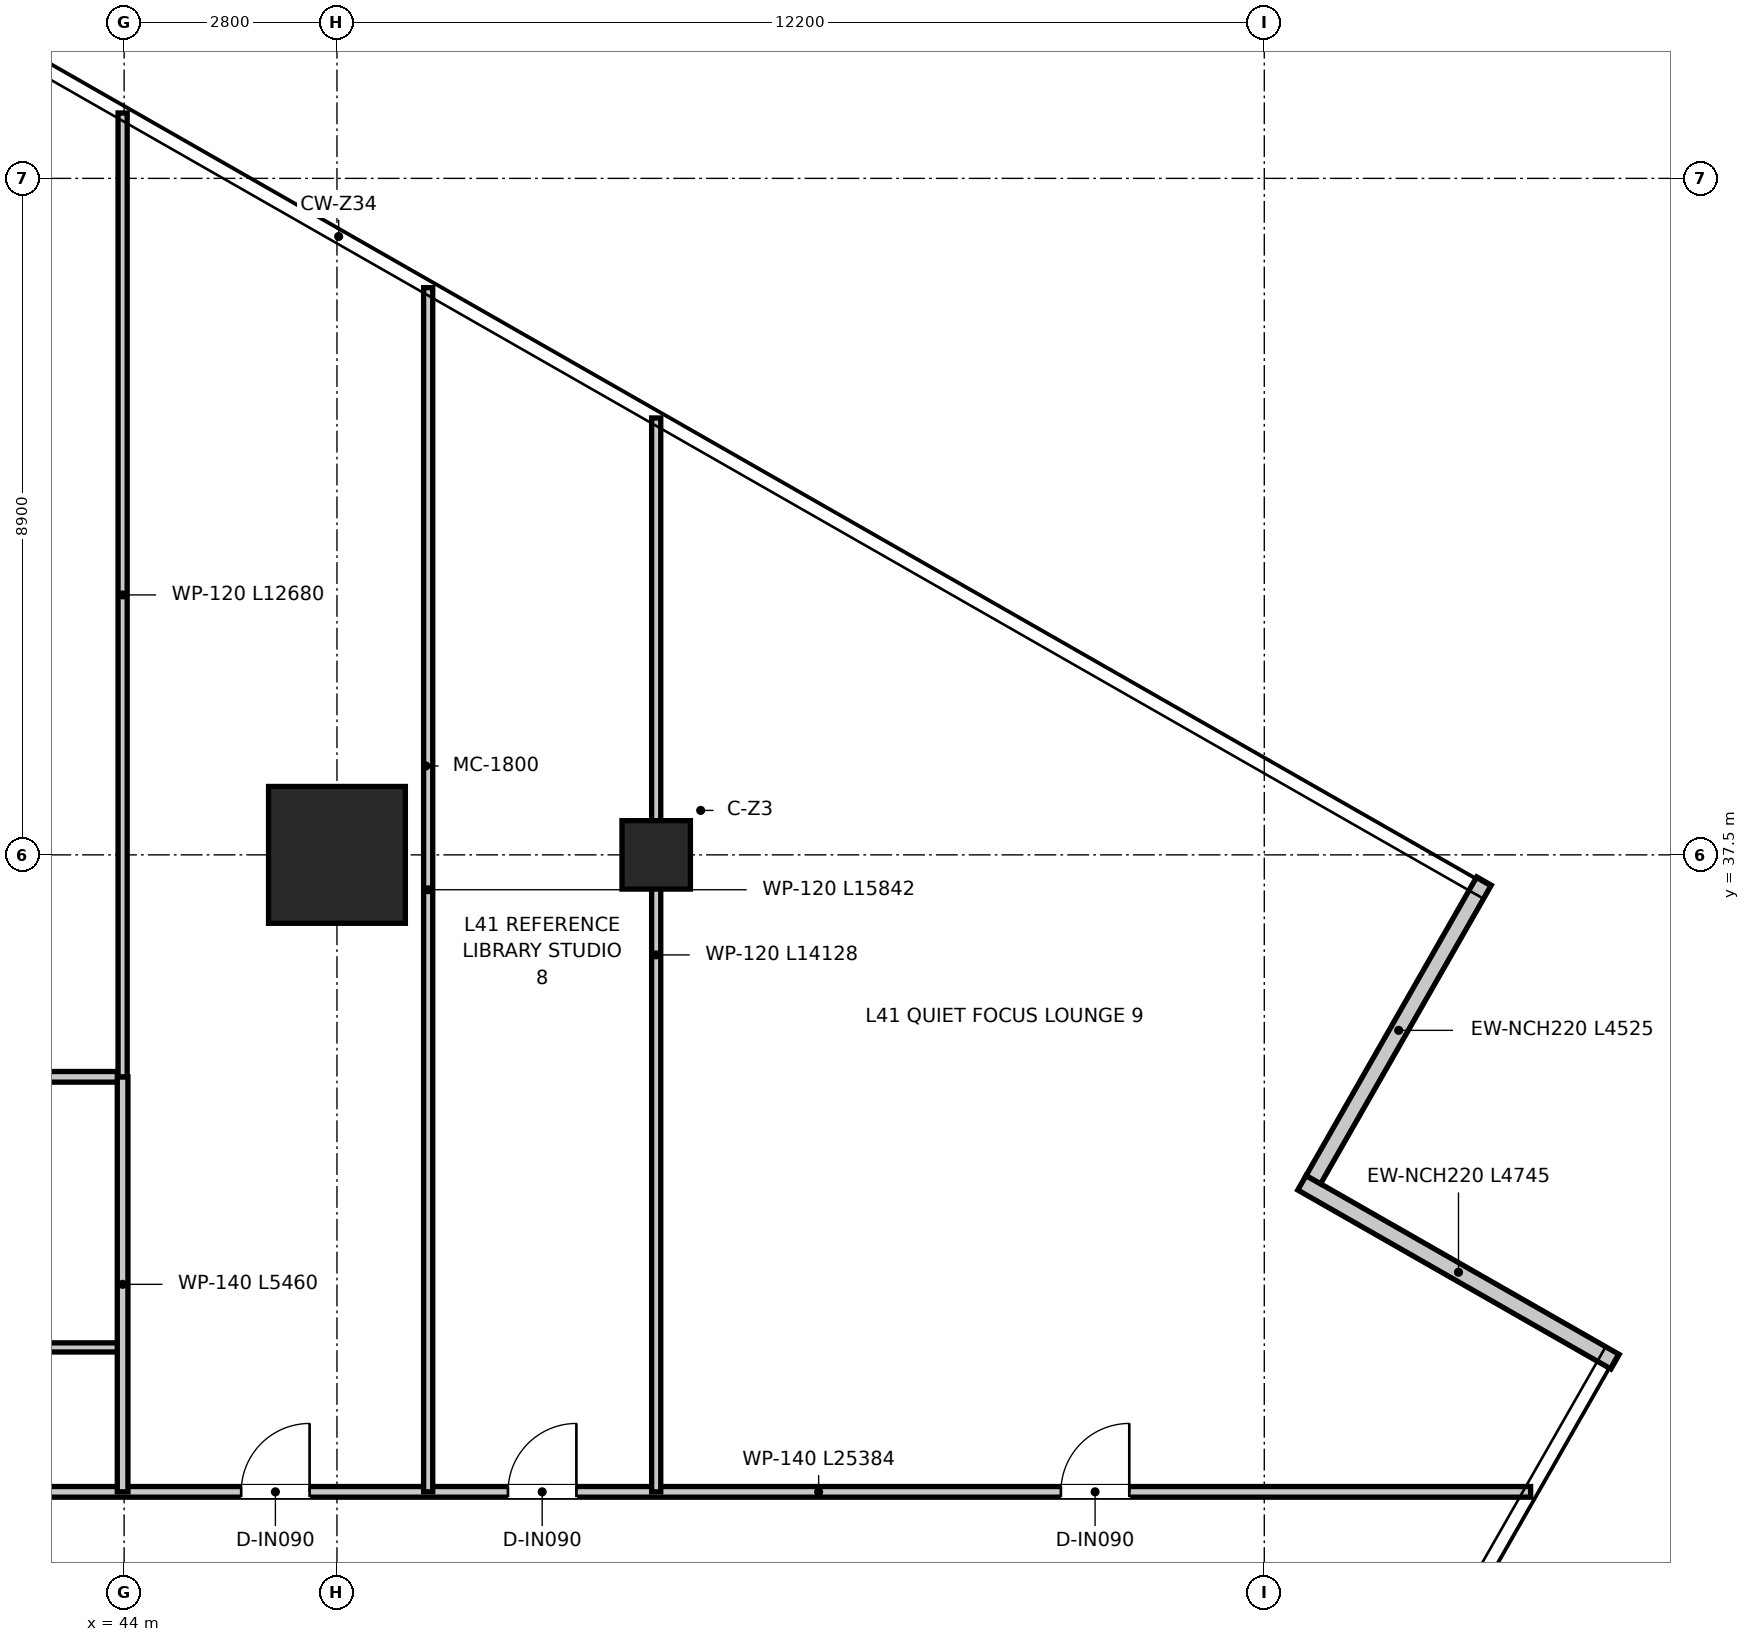
"""IFC4 building model, lengths in metres.
Left out: names, types, materials, properties, quantities, classifications, styles, units other than length and angle.
Written with IfcOpenShell. Run it as: python <this file> out.ifc"""

import sys

from ifc_helpers import new_model, si_unit, direction, frame, frame_2d, origin, origin_2d, place, context, subcontext, project, spatial, rectangle, extrude, source, transform, mapped, element, fill, save


model = new_model("IFC4")
c1 = context("Model", 3, precision=1e-05, world=origin(), true_north=direction((0.0, 1.0)))
c2 = subcontext(c1, "Body", "Model", "MODEL_VIEW")
j1 = project(units=[si_unit("LENGTHUNIT", "METRE"), si_unit("PLANEANGLEUNIT", "RADIAN")], contexts=[c1])
p1 = place(None, origin())
s1 = spatial("IfcSite", under=j1, at=p1, CompositionType="ELEMENT")
p2 = place(p1, origin())
s2 = spatial("IfcBuilding", under=s1, at=p2, CompositionType="ELEMENT")
p3 = place(p2, frame((0.0, 0.0, 169.9)))
s3 = spatial("IfcBuildingStorey", under=s2, at=p3, CompositionType="ELEMENT", Elevation=169.9)
m1 = source(origin(), c2, "Body", "SweptSolid", [
    extrude(rectangle(XDim=1.8, YDim=1.8, at=origin_2d()), origin(), (0.0, 0.0, 1.0), 3.95),
])
p4 = place(p3, frame((46.8, 37.5, 0.0), z_axis=(0.0, 0.0, 1.0), x_axis=(1.0, 0.0, 0.0)))
e1 = element("IfcColumn", 1, at=p4, inside=s3, PredefinedType="USERDEFINED", context=c2, shape_type="MappedRepresentation", body=[
    mapped(m1, transform((0.0, 0.0, 0.0), x_axis=(1.0, 0.0, 0.0), y_axis=(0.0, 1.0, 0.0), z_axis=(0.0, 0.0, 1.0), scale=1.0)),
])
m2 = source(origin(), c2, "Body", "SweptSolid", [
    extrude(rectangle(XDim=0.9, YDim=0.9, at=origin_2d()), origin(), (0.0, 0.0, 1.0), 3.95),
])
p5 = place(p3, frame((51.0, 37.5, 0.0), z_axis=(0.0, 0.0, 1.0), x_axis=(1.0, 0.0, 0.0)))
e2 = element("IfcColumn", 2, at=p5, inside=s3, PredefinedType="COLUMN", context=c2, shape_type="MappedRepresentation", body=[
    mapped(m2, transform((0.0, 0.0, 0.0), x_axis=(1.0, 0.0, 0.0), y_axis=(0.0, 1.0, 0.0), z_axis=(0.0, 0.0, 1.0), scale=1.0)),
])
p6 = place(p3, frame((63.615, 30.832, 0.0), z_axis=(0.0, 0.0, 1.0), x_axis=(-0.868170306664, 0.496266378698, 0.0)))
e3 = element("IfcWall", 3, at=p6, inside=s3, PredefinedType="ELEMENTEDWALL", context=c2, shape_type="SweptSolid", body=[
    extrude(rectangle(XDim=4.745, YDim=0.22, at=frame_2d((2.373, 0.0))), origin(), (0.0, 0.0, 1.0), 3.67),
])
p7 = place(p3, frame((59.645, 33.227, 0.0), z_axis=(0.0, 0.0, 1.0), x_axis=(0.496202850194, 0.868206617954, 0.0)))
e4 = element("IfcWall", 4, at=p7, inside=s3, PredefinedType="ELEMENTEDWALL", context=c2, shape_type="SweptSolid", body=[
    extrude(rectangle(XDim=4.525, YDim=0.22, at=frame_2d((2.263, 0.0))), origin(), (0.0, 0.0, 1.0), 3.67),
])
p8 = place(p3, frame((37.12, 29.12, 0.0), z_axis=(0.0, 0.0, 1.0), x_axis=(1.0, 0.0, 0.0)))
e5 = element("IfcWall", 5, at=p8, inside=s3, PredefinedType="PARTITIONING", context=c2, shape_type="SweptSolid", body=[
    extrude(rectangle(XDim=25.384, YDim=0.14, at=frame_2d((12.692, 0.0))), origin(), (0.0, 0.0, 1.0), 3.03),
])
p9 = place(p8, frame((3.03, 0.0, 0.0)))
e6 = element("IfcOpeningElement", 6, at=p9, cuts=e5, PredefinedType="OPENING", context=c2, shape_type="SweptSolid", body=[
    extrude(rectangle(XDim=0.9, YDim=2.1, at=frame_2d((0.45, 1.05))), frame((0.0, 0.08, 0.0), z_axis=(0.0, -1.0, 0.0), x_axis=(1.0, 0.0, 0.0)), (0.0, 0.0, 1.0), 0.16),
])
p10 = place(p8, frame((8.42, 0.0, 0.0)))
e7 = element("IfcOpeningElement", 7, at=p10, cuts=e5, PredefinedType="OPENING", context=c2, shape_type="SweptSolid", body=[
    extrude(rectangle(XDim=0.9, YDim=2.1, at=frame_2d((0.45, 1.05))), frame((0.0, 0.08, 0.0), z_axis=(0.0, -1.0, 0.0), x_axis=(1.0, 0.0, 0.0)), (0.0, 0.0, 1.0), 0.16),
])
p11 = place(p8, frame((11.93, 0.0, 0.0)))
e8 = element("IfcOpeningElement", 8, at=p11, cuts=e5, PredefinedType="OPENING", context=c2, shape_type="SweptSolid", body=[
    extrude(rectangle(XDim=0.9, YDim=2.1, at=frame_2d((0.45, 1.05))), frame((0.0, 0.08, 0.0), z_axis=(0.0, -1.0, 0.0), x_axis=(1.0, 0.0, 0.0)), (0.0, 0.0, 1.0), 0.16),
])
p12 = place(p8, frame((19.204, 0.0, 0.0)))
e9 = element("IfcOpeningElement", 9, at=p12, cuts=e5, PredefinedType="OPENING", context=c2, shape_type="SweptSolid", body=[
    extrude(rectangle(XDim=0.9, YDim=2.1, at=frame_2d((0.45, 1.05))), frame((0.0, 0.08, 0.0), z_axis=(0.0, -1.0, 0.0), x_axis=(1.0, 0.0, 0.0)), (0.0, 0.0, 1.0), 0.16),
])
p13 = place(p3, frame((37.12, 31.02, 0.0), z_axis=(0.0, 0.0, 1.0), x_axis=(1.0, 0.0, 0.0)))
e10 = element("IfcWall", 10, at=p13, inside=s3, PredefinedType="PARTITIONING", context=c2, shape_type="SweptSolid", body=[
    extrude(rectangle(XDim=6.86, YDim=0.12, at=frame_2d((3.43, 0.0))), origin(), (0.0, 0.0, 1.0), 3.08),
])
p14 = place(p3, frame((37.12, 34.58, 0.0), z_axis=(0.0, 0.0, 1.0), x_axis=(1.0, 0.0, 0.0)))
e11 = element("IfcWall", 11, at=p14, inside=s3, PredefinedType="PARTITIONING", context=c2, shape_type="SweptSolid", body=[
    extrude(rectangle(XDim=6.86, YDim=0.14, at=frame_2d((3.43, 0.0))), origin(), (0.0, 0.0, 1.0), 3.08),
])
p15 = place(p3, frame((43.98, 29.12, 0.0), z_axis=(0.0, 0.0, 1.0), x_axis=(0.0, 1.0, 0.0)))
e12 = element("IfcWall", 12, at=p15, inside=s3, PredefinedType="PARTITIONING", context=c2, shape_type="SweptSolid", body=[
    extrude(rectangle(XDim=5.46, YDim=0.14, at=frame_2d((2.73, 0.0))), origin(), (0.0, 0.0, 1.0), 3.31),
])
p16 = place(p3, frame((43.98, 34.58, 0.0), z_axis=(0.0, 0.0, 1.0), x_axis=(0.0, 1.0, 0.0)))
e13 = element("IfcWall", 13, at=p16, inside=s3, PredefinedType="PARTITIONING", context=c2, shape_type="SweptSolid", body=[
    extrude(rectangle(XDim=12.68, YDim=0.12, at=frame_2d((6.34, 0.0))), origin(), (0.0, 0.0, 1.0), 3.03),
])
p17 = place(p3, frame((48.0, 29.12, 0.0), z_axis=(0.0, 0.0, 1.0), x_axis=(0.0, 1.0, 0.0)))
e14 = element("IfcWall", 14, at=p17, inside=s3, PredefinedType="PARTITIONING", context=c2, shape_type="SweptSolid", body=[
    extrude(rectangle(XDim=15.842, YDim=0.12, at=frame_2d((7.921, 0.0))), origin(), (0.0, 0.0, 1.0), 3.08),
])
p18 = place(p3, frame((51.0, 29.12, 0.0), z_axis=(0.0, 0.0, 1.0), x_axis=(0.0, 1.0, 0.0)))
e15 = element("IfcWall", 15, at=p18, inside=s3, PredefinedType="PARTITIONING", context=c2, shape_type="SweptSolid", body=[
    extrude(rectangle(XDim=14.128, YDim=0.12, at=frame_2d((7.064, 0.0))), origin(), (0.0, 0.0, 1.0), 3.08),
])
p19 = place(p10, origin())
e16 = element("IfcDoor", 16, at=p19, inside=s3, OperationType="SINGLE_SWING_RIGHT", PredefinedType="DOOR", context=c2, shape_type="SweptSolid", body=[
    extrude(rectangle(XDim=0.9, YDim=2.1, at=frame_2d((0.45, 1.05))), frame((0.0, 0.025, 0.0), z_axis=(0.0, -1.0, 0.0), x_axis=(1.0, 0.0, 0.0)), (0.0, 0.0, 1.0), 0.05),
])
fill(e7, e16)
p20 = place(p11, origin())
e17 = element("IfcDoor", 17, at=p20, inside=s3, OperationType="SINGLE_SWING_RIGHT", PredefinedType="DOOR", context=c2, shape_type="SweptSolid", body=[
    extrude(rectangle(XDim=0.9, YDim=2.1, at=frame_2d((0.45, 1.05))), frame((0.0, 0.025, 0.0), z_axis=(0.0, -1.0, 0.0), x_axis=(1.0, 0.0, 0.0)), (0.0, 0.0, 1.0), 0.05),
])
fill(e8, e17)
p21 = place(p12, origin())
e18 = element("IfcDoor", 18, at=p21, inside=s3, OperationType="SINGLE_SWING_RIGHT", PredefinedType="DOOR", context=c2, shape_type="SweptSolid", body=[
    extrude(rectangle(XDim=0.9, YDim=2.1, at=frame_2d((0.45, 1.05))), frame((0.0, 0.025, 0.0), z_axis=(0.0, -1.0, 0.0), x_axis=(1.0, 0.0, 0.0)), (0.0, 0.0, 1.0), 0.05),
])
fill(e9, e18)
save(model, sys.argv[1])
